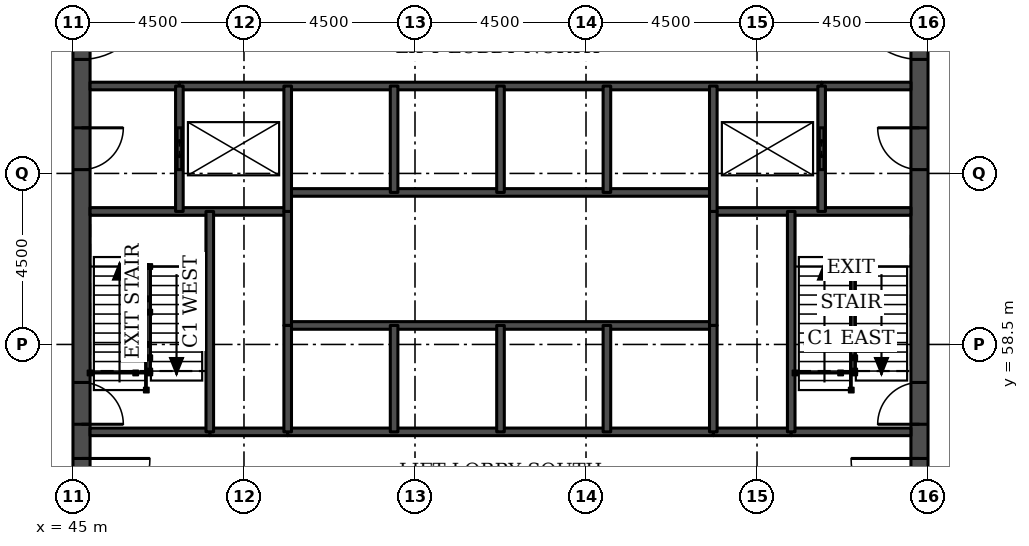
"""IFC4 building model, lengths in metres.
Left out: names, types, materials, properties, quantities, classifications, styles, units other than length and angle.
Written with IfcOpenShell. Run it as: python <this file> out.ifc"""

import sys

from ifc_helpers import new_model, si_unit, direction, frame, frame_2d, origin, place, context, subcontext, project, spatial, rectangle, extrude, element, fill, save


model = new_model("IFC4")
c1 = context("Model", 3, precision=1e-05, world=origin(), true_north=direction((0.0, 1.0)))
c2 = subcontext(c1, "Body", "Model", "MODEL_VIEW")
j1 = project(units=[si_unit("LENGTHUNIT", "METRE"), si_unit("PLANEANGLEUNIT", "RADIAN")], contexts=[c1])
p1 = place(None, origin())
s1 = spatial("IfcSite", under=j1, at=p1, CompositionType="ELEMENT")
p2 = place(p1, origin())
s2 = spatial("IfcBuilding", under=s1, at=p2, CompositionType="ELEMENT")
p3 = place(p2, frame((0.0, 0.0, 97.4)))
s3 = spatial("IfcBuildingStorey", under=s2, at=p3, CompositionType="ELEMENT", Elevation=97.4)
p4 = place(p3, frame((45.225, 49.5, 0.0), z_axis=(0.0, 0.0, 1.0), x_axis=(0.0, 1.0, 0.0)))
e1 = element("IfcWall", 1, at=p4, inside=s3, PredefinedType="SHEAR", context=c2, shape_type="SweptSolid", body=[
    extrude(rectangle(XDim=22.5, YDim=0.45, at=frame_2d((11.25, 0.0))), origin(), (0.0, 0.0, 1.0), 3.7),
])
p5 = place(p4, frame((4.2, 0.0, 0.0)))
e2 = element("IfcOpeningElement", 2, at=p5, cuts=e1, PredefinedType="OPENING", context=c2, shape_type="SweptSolid", body=[
    extrude(rectangle(XDim=1.8, YDim=2.1, at=frame_2d((0.9, 1.05))), frame((0.0, 0.235, 0.0), z_axis=(0.0, -1.0, 0.0), x_axis=(1.0, 0.0, 0.0)), (0.0, 0.0, 1.0), 0.47),
])
p6 = place(p4, frame((6.9, 0.0, 0.0)))
e3 = element("IfcOpeningElement", 3, at=p6, cuts=e1, PredefinedType="OPENING", context=c2, shape_type="SweptSolid", body=[
    extrude(rectangle(XDim=1.1, YDim=2.1, at=frame_2d((0.55, 1.05))), frame((0.0, 0.235, 0.0), z_axis=(0.0, -1.0, 0.0), x_axis=(1.0, 0.0, 0.0)), (0.0, 0.0, 1.0), 0.47),
])
p7 = place(p4, frame((13.6, 0.0, 0.0)))
e4 = element("IfcOpeningElement", 4, at=p7, cuts=e1, PredefinedType="OPENING", context=c2, shape_type="SweptSolid", body=[
    extrude(rectangle(XDim=1.1, YDim=2.1, at=frame_2d((0.55, 1.05))), frame((0.0, 0.235, 0.0), z_axis=(0.0, -1.0, 0.0), x_axis=(1.0, 0.0, 0.0)), (0.0, 0.0, 1.0), 0.47),
])
p8 = place(p4, frame((16.5, 0.0, 0.0)))
e5 = element("IfcOpeningElement", 5, at=p8, cuts=e1, PredefinedType="OPENING", context=c2, shape_type="SweptSolid", body=[
    extrude(rectangle(XDim=1.8, YDim=2.1, at=frame_2d((0.9, 1.05))), frame((0.0, 0.235, 0.0), z_axis=(0.0, -1.0, 0.0), x_axis=(1.0, 0.0, 0.0)), (0.0, 0.0, 1.0), 0.47),
])
p9 = place(p3, frame((67.275, 49.5, 0.0), z_axis=(0.0, 0.0, 1.0), x_axis=(0.0, 1.0, 0.0)))
e6 = element("IfcWall", 6, at=p9, inside=s3, PredefinedType="SHEAR", context=c2, shape_type="SweptSolid", body=[
    extrude(rectangle(XDim=22.5, YDim=0.45, at=frame_2d((11.25, 0.0))), origin(), (0.0, 0.0, 1.0), 3.7),
])
p10 = place(p9, frame((4.2, 0.0, 0.0)))
e7 = element("IfcOpeningElement", 7, at=p10, cuts=e6, PredefinedType="OPENING", context=c2, shape_type="SweptSolid", body=[
    extrude(rectangle(XDim=1.8, YDim=2.1, at=frame_2d((0.9, 1.05))), frame((0.0, 0.235, 0.0), z_axis=(0.0, -1.0, 0.0), x_axis=(1.0, 0.0, 0.0)), (0.0, 0.0, 1.0), 0.47),
])
p11 = place(p9, frame((6.9, 0.0, 0.0)))
e8 = element("IfcOpeningElement", 8, at=p11, cuts=e6, PredefinedType="OPENING", context=c2, shape_type="SweptSolid", body=[
    extrude(rectangle(XDim=1.1, YDim=2.1, at=frame_2d((0.55, 1.05))), frame((0.0, 0.235, 0.0), z_axis=(0.0, -1.0, 0.0), x_axis=(1.0, 0.0, 0.0)), (0.0, 0.0, 1.0), 0.47),
])
p12 = place(p9, frame((13.6, 0.0, 0.0)))
e9 = element("IfcOpeningElement", 9, at=p12, cuts=e6, PredefinedType="OPENING", context=c2, shape_type="SweptSolid", body=[
    extrude(rectangle(XDim=1.1, YDim=2.1, at=frame_2d((0.55, 1.05))), frame((0.0, 0.235, 0.0), z_axis=(0.0, -1.0, 0.0), x_axis=(1.0, 0.0, 0.0)), (0.0, 0.0, 1.0), 0.47),
])
p13 = place(p9, frame((16.5, 0.0, 0.0)))
e10 = element("IfcOpeningElement", 10, at=p13, cuts=e6, PredefinedType="OPENING", context=c2, shape_type="SweptSolid", body=[
    extrude(rectangle(XDim=1.8, YDim=2.1, at=frame_2d((0.9, 1.05))), frame((0.0, 0.235, 0.0), z_axis=(0.0, -1.0, 0.0), x_axis=(1.0, 0.0, 0.0)), (0.0, 0.0, 1.0), 0.47),
])
for number, where, z_axis, x_axis in (
    (11, (48.6, 56.2, 0.0), (0.0, 0.0, 1.0), (1.0, 0.0, 0.0)),
    (12, (61.85, 56.2, 0.0), (0.0, 0.0, 1.0), (1.0, 0.0, 0.0)),
):
    element("IfcWall", number, at=place(p3, frame(where, z_axis=z_axis, x_axis=x_axis)), inside=s3, PredefinedType="SOLIDWALL", context=c2, shape_type="SweptSolid", body=[
        extrude(rectangle(XDim=2.05, YDim=0.2, at=frame_2d((1.025, 0.0))), origin(), (0.0, 0.0, 1.0), 3.55),
    ])
p14 = place(p3, frame((45.45, 56.2, 0.0), z_axis=(0.0, 0.0, 1.0), x_axis=(1.0, 0.0, 0.0)))
e13 = element("IfcWall", 13, at=p14, inside=s3, PredefinedType="SOLIDWALL", context=c2, shape_type="SweptSolid", body=[
    extrude(rectangle(XDim=3.15, YDim=0.2, at=frame_2d((1.575, 0.0))), origin(), (0.0, 0.0, 1.0), 3.55),
])
p15 = place(p3, frame((50.65, 56.2, 0.0), z_axis=(0.0, 0.0, 1.0), x_axis=(1.0, 0.0, 0.0)))
e14 = element("IfcWall", 14, at=p15, inside=s3, PredefinedType="SOLIDWALL", context=c2, shape_type="SweptSolid", body=[
    extrude(rectangle(XDim=11.2, YDim=0.2, at=frame_2d((5.6, 0.0))), origin(), (0.0, 0.0, 1.0), 3.55),
])
p16 = place(p3, frame((63.9, 56.2, 0.0), z_axis=(0.0, 0.0, 1.0), x_axis=(1.0, 0.0, 0.0)))
e15 = element("IfcWall", 15, at=p16, inside=s3, PredefinedType="SOLIDWALL", context=c2, shape_type="SweptSolid", body=[
    extrude(rectangle(XDim=3.15, YDim=0.2, at=frame_2d((1.575, 0.0))), origin(), (0.0, 0.0, 1.0), 3.55),
])
p17 = place(p3, frame((50.65, 59.0, 0.0), z_axis=(0.0, 0.0, 1.0), x_axis=(1.0, 0.0, 0.0)))
e16 = element("IfcWall", 16, at=p17, inside=s3, PredefinedType="SOLIDWALL", context=c2, shape_type="SweptSolid", body=[
    extrude(rectangle(XDim=11.2, YDim=0.2, at=frame_2d((5.6, 0.0))), origin(), (0.0, 0.0, 1.0), 3.7),
])
for number, where, z_axis, x_axis in (
    (17, (45.45, 62.0, 0.0), (0.0, 0.0, 1.0), (1.0, 0.0, 0.0)),
    (18, (61.85, 62.0, 0.0), (0.0, 0.0, 1.0), (1.0, 0.0, 0.0)),
):
    element("IfcWall", number, at=place(p3, frame(where, z_axis=z_axis, x_axis=x_axis)), inside=s3, PredefinedType="SOLIDWALL", context=c2, shape_type="SweptSolid", body=[
        extrude(rectangle(XDim=5.2, YDim=0.2, at=frame_2d((2.6, 0.0))), origin(), (0.0, 0.0, 1.0), 3.55),
    ])
p18 = place(p3, frame((50.65, 62.5, 0.0), z_axis=(0.0, 0.0, 1.0), x_axis=(1.0, 0.0, 0.0)))
e19 = element("IfcWall", 19, at=p18, inside=s3, PredefinedType="SOLIDWALL", context=c2, shape_type="SweptSolid", body=[
    extrude(rectangle(XDim=11.2, YDim=0.2, at=frame_2d((5.6, 0.0))), origin(), (0.0, 0.0, 1.0), 3.7),
])
for number, where, z_axis, x_axis in (
    (20, (45.45, 65.3, 0.0), (0.0, 0.0, 1.0), (1.0, 0.0, 0.0)),
    (21, (64.7, 65.3, 0.0), (0.0, 0.0, 1.0), (1.0, 0.0, 0.0)),
):
    element("IfcWall", number, at=place(p3, frame(where, z_axis=z_axis, x_axis=x_axis)), inside=s3, PredefinedType="SOLIDWALL", context=c2, shape_type="SweptSolid", body=[
        extrude(rectangle(XDim=2.35, YDim=0.2, at=frame_2d((1.175, 0.0))), origin(), (0.0, 0.0, 1.0), 3.55),
    ])
p19 = place(p3, frame((47.8, 65.3, 0.0), z_axis=(0.0, 0.0, 1.0), x_axis=(1.0, 0.0, 0.0)))
e22 = element("IfcWall", 22, at=p19, inside=s3, PredefinedType="SOLIDWALL", context=c2, shape_type="SweptSolid", body=[
    extrude(rectangle(XDim=16.9, YDim=0.2, at=frame_2d((8.45, 0.0))), origin(), (0.0, 0.0, 1.0), 3.55),
])
p20 = place(p3, frame((47.8, 62.0, 0.0), z_axis=(0.0, 0.0, 1.0), x_axis=(0.0, 1.0, 0.0)))
e23 = element("IfcWall", 23, at=p20, inside=s3, PredefinedType="SOLIDWALL", context=c2, shape_type="SweptSolid", body=[
    extrude(rectangle(XDim=3.3, YDim=0.2, at=frame_2d((1.65, 0.0))), origin(), (0.0, 0.0, 1.0), 3.55),
])
p21 = place(p20, frame((1.1, 0.0, 0.0)))
e24 = element("IfcOpeningElement", 24, at=p21, cuts=e23, PredefinedType="OPENING", context=c2, shape_type="SweptSolid", body=[
    extrude(rectangle(XDim=1.1, YDim=2.1, at=frame_2d((0.55, 1.05))), frame((0.0, 0.11, 0.0), z_axis=(0.0, -1.0, 0.0), x_axis=(1.0, 0.0, 0.0)), (0.0, 0.0, 1.0), 0.22),
])
p22 = place(p3, frame((48.6, 56.2, 0.0), z_axis=(0.0, 0.0, 1.0), x_axis=(0.0, 1.0, 0.0)))
e25 = element("IfcWall", 25, at=p22, inside=s3, PredefinedType="SOLIDWALL", context=c2, shape_type="SweptSolid", body=[
    extrude(rectangle(XDim=5.8, YDim=0.2, at=frame_2d((2.9, 0.0))), origin(), (0.0, 0.0, 1.0), 3.55),
])
p23 = place(p3, frame((50.65, 59.0, 0.0), z_axis=(0.0, 0.0, 1.0), x_axis=(0.0, 1.0, 0.0)))
e26 = element("IfcWall", 26, at=p23, inside=s3, PredefinedType="SOLIDWALL", context=c2, shape_type="SweptSolid", body=[
    extrude(rectangle(XDim=3.0, YDim=0.2, at=frame_2d((1.5, 0.0))), origin(), (0.0, 0.0, 1.0), 3.7),
])
p24 = place(p3, frame((50.65, 56.2, 0.0), z_axis=(0.0, 0.0, 1.0), x_axis=(0.0, 1.0, 0.0)))
e27 = element("IfcWall", 27, at=p24, inside=s3, PredefinedType="SOLIDWALL", context=c2, shape_type="SweptSolid", body=[
    extrude(rectangle(XDim=2.8, YDim=0.2, at=frame_2d((1.4, 0.0))), origin(), (0.0, 0.0, 1.0), 3.55),
])
p25 = place(p3, frame((50.65, 62.0, 0.0), z_axis=(0.0, 0.0, 1.0), x_axis=(0.0, 1.0, 0.0)))
e28 = element("IfcWall", 28, at=p25, inside=s3, PredefinedType="SOLIDWALL", context=c2, shape_type="SweptSolid", body=[
    extrude(rectangle(XDim=3.3, YDim=0.2, at=frame_2d((1.65, 0.0))), origin(), (0.0, 0.0, 1.0), 3.55),
])
for number, where, z_axis, x_axis in (
    (29, (53.45, 56.2, 0.0), (0.0, 0.0, 1.0), (0.0, 1.0, 0.0)),
    (30, (53.45, 62.5, 0.0), (0.0, 0.0, 1.0), (0.0, 1.0, 0.0)),
    (31, (56.25, 56.2, 0.0), (0.0, 0.0, 1.0), (0.0, 1.0, 0.0)),
    (32, (56.25, 62.5, 0.0), (0.0, 0.0, 1.0), (0.0, 1.0, 0.0)),
    (33, (59.05, 56.2, 0.0), (0.0, 0.0, 1.0), (0.0, 1.0, 0.0)),
    (34, (59.05, 62.5, 0.0), (0.0, 0.0, 1.0), (0.0, 1.0, 0.0)),
):
    element("IfcWall", number, at=place(p3, frame(where, z_axis=z_axis, x_axis=x_axis)), inside=s3, PredefinedType="SOLIDWALL", context=c2, shape_type="SweptSolid", body=[
        extrude(rectangle(XDim=2.8, YDim=0.2, at=frame_2d((1.4, 0.0))), origin(), (0.0, 0.0, 1.0), 3.55),
    ])
p26 = place(p3, frame((61.85, 59.0, 0.0), z_axis=(0.0, 0.0, 1.0), x_axis=(0.0, 1.0, 0.0)))
e35 = element("IfcWall", 35, at=p26, inside=s3, PredefinedType="SOLIDWALL", context=c2, shape_type="SweptSolid", body=[
    extrude(rectangle(XDim=3.0, YDim=0.2, at=frame_2d((1.5, 0.0))), origin(), (0.0, 0.0, 1.0), 3.7),
])
p27 = place(p3, frame((61.85, 56.2, 0.0), z_axis=(0.0, 0.0, 1.0), x_axis=(0.0, 1.0, 0.0)))
e36 = element("IfcWall", 36, at=p27, inside=s3, PredefinedType="SOLIDWALL", context=c2, shape_type="SweptSolid", body=[
    extrude(rectangle(XDim=2.8, YDim=0.2, at=frame_2d((1.4, 0.0))), origin(), (0.0, 0.0, 1.0), 3.55),
])
p28 = place(p3, frame((61.85, 62.0, 0.0), z_axis=(0.0, 0.0, 1.0), x_axis=(0.0, 1.0, 0.0)))
e37 = element("IfcWall", 37, at=p28, inside=s3, PredefinedType="SOLIDWALL", context=c2, shape_type="SweptSolid", body=[
    extrude(rectangle(XDim=3.3, YDim=0.2, at=frame_2d((1.65, 0.0))), origin(), (0.0, 0.0, 1.0), 3.55),
])
p29 = place(p3, frame((63.9, 56.2, 0.0), z_axis=(0.0, 0.0, 1.0), x_axis=(0.0, 1.0, 0.0)))
e38 = element("IfcWall", 38, at=p29, inside=s3, PredefinedType="SOLIDWALL", context=c2, shape_type="SweptSolid", body=[
    extrude(rectangle(XDim=5.8, YDim=0.2, at=frame_2d((2.9, 0.0))), origin(), (0.0, 0.0, 1.0), 3.55),
])
p30 = place(p3, frame((64.7, 62.0, 0.0), z_axis=(0.0, 0.0, 1.0), x_axis=(0.0, 1.0, 0.0)))
e39 = element("IfcWall", 39, at=p30, inside=s3, PredefinedType="SOLIDWALL", context=c2, shape_type="SweptSolid", body=[
    extrude(rectangle(XDim=3.3, YDim=0.2, at=frame_2d((1.65, 0.0))), origin(), (0.0, 0.0, 1.0), 3.55),
])
p31 = place(p30, frame((1.1, 0.0, 0.0)))
e40 = element("IfcOpeningElement", 40, at=p31, cuts=e39, PredefinedType="OPENING", context=c2, shape_type="SweptSolid", body=[
    extrude(rectangle(XDim=1.1, YDim=2.1, at=frame_2d((0.55, 1.05))), frame((0.0, 0.11, 0.0), z_axis=(0.0, -1.0, 0.0), x_axis=(1.0, 0.0, 0.0)), (0.0, 0.0, 1.0), 0.22),
])
p32 = place(p21, origin())
e41 = element("IfcDoor", 41, at=p32, inside=s3, OperationType="DOUBLE_DOOR_SLIDING", PredefinedType="DOOR", context=c2, shape_type="SweptSolid", body=[
    extrude(rectangle(XDim=1.1, YDim=2.1, at=frame_2d((0.55, 1.05))), frame((0.0, 0.025, 0.0), z_axis=(0.0, -1.0, 0.0), x_axis=(1.0, 0.0, 0.0)), (0.0, 0.0, 1.0), 0.05),
])
fill(e24, e41)
p33 = place(p31, origin())
e42 = element("IfcDoor", 42, at=p33, inside=s3, OperationType="DOUBLE_DOOR_SLIDING", PredefinedType="DOOR", context=c2, shape_type="SweptSolid", body=[
    extrude(rectangle(XDim=1.1, YDim=2.1, at=frame_2d((0.55, 1.05))), frame((0.0, 0.025, 0.0), z_axis=(0.0, -1.0, 0.0), x_axis=(1.0, 0.0, 0.0)), (0.0, 0.0, 1.0), 0.05),
])
fill(e40, e42)
p34 = place(p5, frame((1.8, 0.0, 0.0), z_axis=(0.0, 0.0, 1.0), x_axis=(-1.0, 0.0, 0.0)))
e43 = element("IfcDoor", 43, at=p34, inside=s3, OperationType="SINGLE_SWING_LEFT", PredefinedType="DOOR", context=c2, shape_type="SweptSolid", body=[
    extrude(rectangle(XDim=1.8, YDim=2.1, at=frame_2d((0.9, 1.05))), frame((0.0, 0.025, 0.0), z_axis=(0.0, -1.0, 0.0), x_axis=(1.0, 0.0, 0.0)), (0.0, 0.0, 1.0), 0.05),
])
fill(e2, e43)
p35 = place(p6, frame((1.1, 0.0, 0.0), z_axis=(0.0, 0.0, 1.0), x_axis=(-1.0, 0.0, 0.0)))
e44 = element("IfcDoor", 44, at=p35, inside=s3, OperationType="SINGLE_SWING_RIGHT", PredefinedType="DOOR", context=c2, shape_type="SweptSolid", body=[
    extrude(rectangle(XDim=1.1, YDim=2.1, at=frame_2d((0.55, 1.05))), frame((0.0, 0.025, 0.0), z_axis=(0.0, -1.0, 0.0), x_axis=(1.0, 0.0, 0.0)), (0.0, 0.0, 1.0), 0.05),
])
fill(e3, e44)
p36 = place(p7, frame((1.1, 0.0, 0.0), z_axis=(0.0, 0.0, 1.0), x_axis=(-1.0, 0.0, 0.0)))
e45 = element("IfcDoor", 45, at=p36, inside=s3, OperationType="SINGLE_SWING_LEFT", PredefinedType="DOOR", context=c2, shape_type="SweptSolid", body=[
    extrude(rectangle(XDim=1.1, YDim=2.1, at=frame_2d((0.55, 1.05))), frame((0.0, 0.025, 0.0), z_axis=(0.0, -1.0, 0.0), x_axis=(1.0, 0.0, 0.0)), (0.0, 0.0, 1.0), 0.05),
])
fill(e4, e45)
p37 = place(p8, frame((1.8, 0.0, 0.0), z_axis=(0.0, 0.0, 1.0), x_axis=(-1.0, 0.0, 0.0)))
e46 = element("IfcDoor", 46, at=p37, inside=s3, OperationType="SINGLE_SWING_LEFT", PredefinedType="DOOR", context=c2, shape_type="SweptSolid", body=[
    extrude(rectangle(XDim=1.8, YDim=2.1, at=frame_2d((0.9, 1.05))), frame((0.0, 0.025, 0.0), z_axis=(0.0, -1.0, 0.0), x_axis=(1.0, 0.0, 0.0)), (0.0, 0.0, 1.0), 0.05),
])
fill(e5, e46)
p38 = place(p10, origin())
e47 = element("IfcDoor", 47, at=p38, inside=s3, OperationType="SINGLE_SWING_RIGHT", PredefinedType="DOOR", context=c2, shape_type="SweptSolid", body=[
    extrude(rectangle(XDim=1.8, YDim=2.1, at=frame_2d((0.9, 1.05))), frame((0.0, 0.025, 0.0), z_axis=(0.0, -1.0, 0.0), x_axis=(1.0, 0.0, 0.0)), (0.0, 0.0, 1.0), 0.05),
])
fill(e7, e47)
p39 = place(p11, origin())
e48 = element("IfcDoor", 48, at=p39, inside=s3, OperationType="SINGLE_SWING_LEFT", PredefinedType="DOOR", context=c2, shape_type="SweptSolid", body=[
    extrude(rectangle(XDim=1.1, YDim=2.1, at=frame_2d((0.55, 1.05))), frame((0.0, 0.025, 0.0), z_axis=(0.0, -1.0, 0.0), x_axis=(1.0, 0.0, 0.0)), (0.0, 0.0, 1.0), 0.05),
])
fill(e8, e48)
p40 = place(p12, origin())
e49 = element("IfcDoor", 49, at=p40, inside=s3, OperationType="SINGLE_SWING_RIGHT", PredefinedType="DOOR", context=c2, shape_type="SweptSolid", body=[
    extrude(rectangle(XDim=1.1, YDim=2.1, at=frame_2d((0.55, 1.05))), frame((0.0, 0.025, 0.0), z_axis=(0.0, -1.0, 0.0), x_axis=(1.0, 0.0, 0.0)), (0.0, 0.0, 1.0), 0.05),
])
fill(e9, e49)
p41 = place(p13, origin())
e50 = element("IfcDoor", 50, at=p41, inside=s3, OperationType="SINGLE_SWING_RIGHT", PredefinedType="DOOR", context=c2, shape_type="SweptSolid", body=[
    extrude(rectangle(XDim=1.8, YDim=2.1, at=frame_2d((0.9, 1.05))), frame((0.0, 0.025, 0.0), z_axis=(0.0, -1.0, 0.0), x_axis=(1.0, 0.0, 0.0)), (0.0, 0.0, 1.0), 0.05),
])
fill(e10, e50)
save(model, sys.argv[1])
